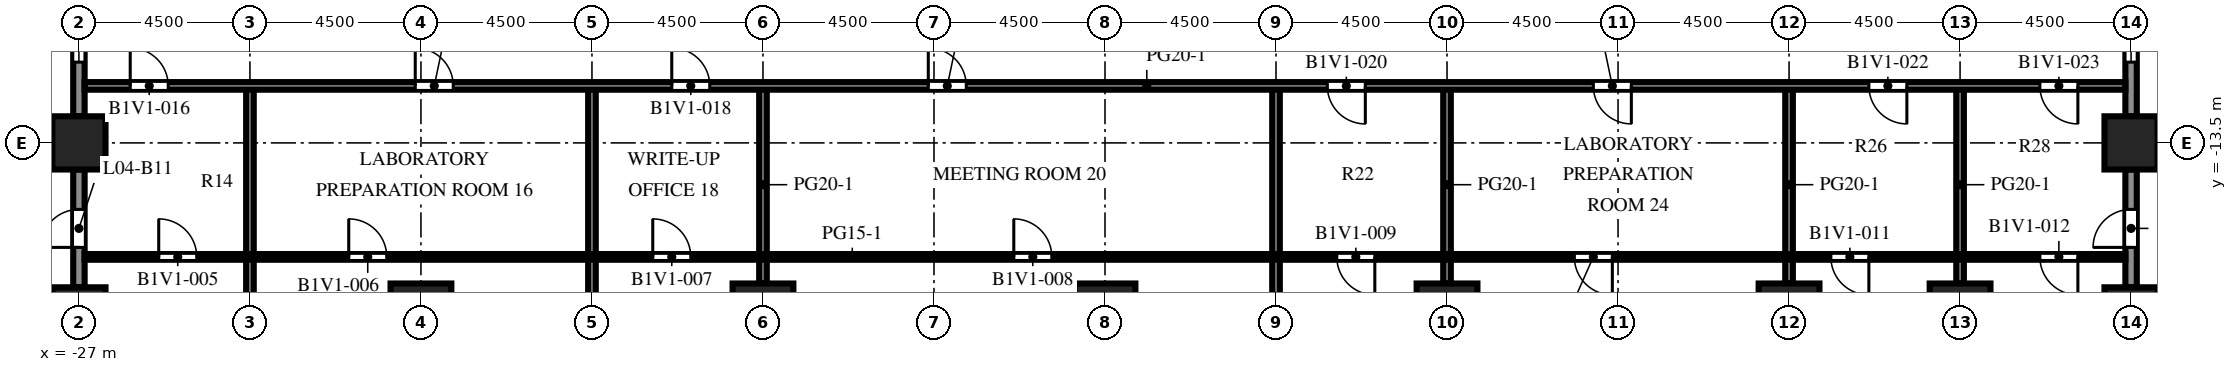
"""IFC4 building model, lengths in metres.
Left out: names, types, materials, properties, quantities, classifications, styles, units other than length and angle.
Written with IfcOpenShell. Run it as: python <this file> out.ifc"""

import sys

from ifc_helpers import new_model, si_unit, direction, frame, frame_2d, origin, origin_2d, place, context, subcontext, project, spatial, rectangle, extrude, element, fill, save


model = new_model("IFC4")
c1 = context("Model", 3, precision=1e-05, world=origin(), true_north=direction((0.0, 1.0)))
c2 = subcontext(c1, "Body", "Model", "MODEL_VIEW")
j1 = project(units=[si_unit("LENGTHUNIT", "METRE"), si_unit("PLANEANGLEUNIT", "RADIAN")], contexts=[c1])
p1 = place(None, origin())
s1 = spatial("IfcSite", under=j1, at=p1, CompositionType="ELEMENT")
p2 = place(p1, origin())
s2 = spatial("IfcBuilding", under=s1, at=p2, CompositionType="ELEMENT")
p3 = place(p2, frame((0.0, 0.0, 19.5)))
s3 = spatial("IfcBuildingStorey", under=s2, at=p3, CompositionType="ELEMENT", Elevation=19.5)
for number, where, z_axis, x_axis in (
    (1, (-27.0, -18.0, 0.0), (0.0, 0.0, 1.0), (1.0, 0.0, 0.0)),
    (2, (-27.0, -13.5, 0.0), (0.0, 0.0, 1.0), (1.0, 0.0, 0.0)),
    (3, (27.0, -18.0, 0.0), (0.0, 0.0, 1.0), (1.0, 0.0, 0.0)),
    (4, (27.0, -13.5, 0.0), (0.0, 0.0, 1.0), (1.0, 0.0, 0.0)),
):
    element("IfcColumn", number, at=place(p3, frame(where, z_axis=z_axis, x_axis=x_axis)), inside=s3, PredefinedType="COLUMN", context=c2, shape_type="SweptSolid", body=[
        extrude(rectangle(XDim=1.4, YDim=1.4, at=origin_2d()), origin(), (0.0, 0.0, 1.0), 4.1),
    ])
for number, where, z_axis, x_axis in (
    (5, (-18.0, -18.0, 0.0), (0.0, 0.0, 1.0), (1.0, 0.0, 0.0)),
    (6, (-9.0, -18.0, 0.0), (0.0, 0.0, 1.0), (1.0, 0.0, 0.0)),
    (7, (0.0, -18.0, 0.0), (0.0, 0.0, 1.0), (1.0, 0.0, 0.0)),
    (8, (9.0, -18.0, 0.0), (0.0, 0.0, 1.0), (1.0, 0.0, 0.0)),
    (9, (18.0, -18.0, 0.0), (0.0, 0.0, 1.0), (1.0, 0.0, 0.0)),
    (10, (22.5, -18.0, 0.0), (0.0, 0.0, 1.0), (1.0, 0.0, 0.0)),
):
    element("IfcColumn", number, at=place(p3, frame(where, z_axis=z_axis, x_axis=x_axis)), inside=s3, PredefinedType="COLUMN", context=c2, shape_type="SweptSolid", body=[
        extrude(rectangle(XDim=1.6, YDim=1.6, at=origin_2d()), origin(), (0.0, 0.0, 1.0), 4.1),
    ])
p4 = place(p3, frame((27.0, -14.2, 0.0), z_axis=(0.0, 0.0, 1.0), x_axis=(0.0, -1.0, 0.0)))
e11 = element("IfcWall", 11, at=p4, inside=s3, PredefinedType="SOLIDWALL", context=c2, shape_type="SweptSolid", body=[
    extrude(rectangle(XDim=3.1, YDim=0.3, at=frame_2d((1.55, 0.0))), origin(), (0.0, 0.0, 1.0), 2.75),
])
p5 = place(p4, frame((1.05, 0.0, 0.0)))
e12 = element("IfcOpeningElement", 12, at=p5, cuts=e11, PredefinedType="OPENING", context=c2, shape_type="SweptSolid", body=[
    extrude(rectangle(XDim=1.0, YDim=2.2, at=frame_2d((0.5, 1.1))), frame((0.0, 0.16, 0.0), z_axis=(0.0, -1.0, 0.0), x_axis=(1.0, 0.0, 0.0)), (0.0, 0.0, 1.0), 0.32),
])
p6 = place(p3, frame((27.0, -9.7, 0.0), z_axis=(0.0, 0.0, 1.0), x_axis=(0.0, -1.0, 0.0)))
e13 = element("IfcWall", 13, at=p6, inside=s3, PredefinedType="SOLIDWALL", context=c2, shape_type="SweptSolid", body=[
    extrude(rectangle(XDim=3.1, YDim=0.3, at=frame_2d((1.55, 0.0))), origin(), (0.0, 0.0, 1.0), 2.75),
])
p7 = place(p6, frame((0.475, 0.0, 0.8)))
e14 = element("IfcOpeningElement", 14, at=p7, cuts=e13, PredefinedType="OPENING", context=c2, shape_type="SweptSolid", body=[
    extrude(rectangle(XDim=1.2, YDim=1.7, at=frame_2d((0.6, 0.85))), frame((0.0, 0.16, 0.0), z_axis=(0.0, -1.0, 0.0), x_axis=(1.0, 0.0, 0.0)), (0.0, 0.0, 1.0), 0.32),
])
p8 = place(p3, frame((-27.0, -12.8, 0.0), z_axis=(0.0, 0.0, 1.0), x_axis=(0.0, 1.0, 0.0)))
e15 = element("IfcWall", 15, at=p8, inside=s3, PredefinedType="SOLIDWALL", context=c2, shape_type="SweptSolid", body=[
    extrude(rectangle(XDim=3.1, YDim=0.3, at=frame_2d((1.55, 0.0))), origin(), (0.0, 0.0, 1.0), 2.75),
])
p9 = place(p8, frame((1.425, 0.0, 0.8)))
e16 = element("IfcOpeningElement", 16, at=p9, cuts=e15, PredefinedType="OPENING", context=c2, shape_type="SweptSolid", body=[
    extrude(rectangle(XDim=1.2, YDim=1.7, at=frame_2d((0.6, 0.85))), frame((0.0, 0.16, 0.0), z_axis=(0.0, -1.0, 0.0), x_axis=(1.0, 0.0, 0.0)), (0.0, 0.0, 1.0), 0.32),
])
p10 = place(p3, frame((-27.0, -17.3, 0.0), z_axis=(0.0, 0.0, 1.0), x_axis=(0.0, 1.0, 0.0)))
e17 = element("IfcWall", 17, at=p10, inside=s3, PredefinedType="SOLIDWALL", context=c2, shape_type="SweptSolid", body=[
    extrude(rectangle(XDim=3.1, YDim=0.3, at=frame_2d((1.55, 0.0))), origin(), (0.0, 0.0, 1.0), 2.75),
])
p11 = place(p10, frame((1.05, 0.0, 0.0)))
e18 = element("IfcOpeningElement", 18, at=p11, cuts=e17, PredefinedType="OPENING", context=c2, shape_type="SweptSolid", body=[
    extrude(rectangle(XDim=1.0, YDim=2.2, at=frame_2d((0.5, 1.1))), frame((0.0, 0.16, 0.0), z_axis=(0.0, -1.0, 0.0), x_axis=(1.0, 0.0, 0.0)), (0.0, 0.0, 1.0), 0.32),
])
for number, where, z_axis, x_axis in (
    (19, (-22.5, -26.3, 0.0), (0.0, 0.0, 1.0), (0.0, 1.0, 0.0)),
    (20, (-13.5, -26.3, 0.0), (0.0, 0.0, 1.0), (0.0, 1.0, 0.0)),
):
    element("IfcWall", number, at=place(p3, frame(where, z_axis=z_axis, x_axis=x_axis)), inside=s3, PredefinedType="PARTITIONING", context=c2, shape_type="SweptSolid", body=[
        extrude(rectangle(XDim=14.3, YDim=0.2, at=frame_2d((7.15, 0.0))), origin(), (0.0, 0.0, 1.0), 3.65),
    ])
p12 = place(p3, frame((-9.0, -17.2, 0.0), z_axis=(0.0, 0.0, 1.0), x_axis=(0.0, 1.0, 0.0)))
e21 = element("IfcWall", 21, at=p12, inside=s3, PredefinedType="PARTITIONING", context=c2, shape_type="SweptSolid", body=[
    extrude(rectangle(XDim=5.2, YDim=0.2, at=frame_2d((2.6, 0.0))), origin(), (0.0, 0.0, 1.0), 3.65),
])
p13 = place(p3, frame((4.5, -26.3, 0.0), z_axis=(0.0, 0.0, 1.0), x_axis=(0.0, 1.0, 0.0)))
e22 = element("IfcWall", 22, at=p13, inside=s3, PredefinedType="PARTITIONING", context=c2, shape_type="SweptSolid", body=[
    extrude(rectangle(XDim=14.3, YDim=0.2, at=frame_2d((7.15, 0.0))), origin(), (0.0, 0.0, 1.0), 3.65),
])
for number, where, z_axis, x_axis in (
    (23, (9.0, -17.2, 0.0), (0.0, 0.0, 1.0), (0.0, 1.0, 0.0)),
    (24, (18.0, -17.2, 0.0), (0.0, 0.0, 1.0), (0.0, 1.0, 0.0)),
    (25, (22.5, -17.2, 0.0), (0.0, 0.0, 1.0), (0.0, 1.0, 0.0)),
):
    element("IfcWall", number, at=place(p3, frame(where, z_axis=z_axis, x_axis=x_axis)), inside=s3, PredefinedType="PARTITIONING", context=c2, shape_type="SweptSolid", body=[
        extrude(rectangle(XDim=5.2, YDim=0.2, at=frame_2d((2.6, 0.0))), origin(), (0.0, 0.0, 1.0), 3.65),
    ])
p14 = place(p3, frame((26.85, -16.5, 0.0), z_axis=(0.0, 0.0, 1.0), x_axis=(-1.0, 0.0, 0.0)))
e26 = element("IfcWall", 26, at=p14, inside=s3, PredefinedType="PARTITIONING", context=c2, shape_type="SweptSolid", body=[
    extrude(rectangle(XDim=53.7, YDim=0.15, at=frame_2d((26.85, 0.0))), origin(), (0.0, 0.0, 1.0), 3.65),
])
p15 = place(p14, frame((50.75, 0.0, 0.0)))
e27 = element("IfcOpeningElement", 27, at=p15, cuts=e26, PredefinedType="OPENING", context=c2, shape_type="SweptSolid", body=[
    extrude(rectangle(XDim=1.0, YDim=2.1, at=frame_2d((0.5, 1.05))), frame((0.0, 0.085, 0.0), z_axis=(0.0, -1.0, 0.0), x_axis=(1.0, 0.0, 0.0)), (0.0, 0.0, 1.0), 0.17),
])
p16 = place(p14, frame((45.75, 0.0, 0.0)))
e28 = element("IfcOpeningElement", 28, at=p16, cuts=e26, PredefinedType="OPENING", context=c2, shape_type="SweptSolid", body=[
    extrude(rectangle(XDim=1.0, YDim=2.1, at=frame_2d((0.5, 1.05))), frame((0.0, 0.085, 0.0), z_axis=(0.0, -1.0, 0.0), x_axis=(1.0, 0.0, 0.0)), (0.0, 0.0, 1.0), 0.17),
])
p17 = place(p14, frame((37.75, 0.0, 0.0)))
e29 = element("IfcOpeningElement", 29, at=p17, cuts=e26, PredefinedType="OPENING", context=c2, shape_type="SweptSolid", body=[
    extrude(rectangle(XDim=1.0, YDim=2.1, at=frame_2d((0.5, 1.05))), frame((0.0, 0.085, 0.0), z_axis=(0.0, -1.0, 0.0), x_axis=(1.0, 0.0, 0.0)), (0.0, 0.0, 1.0), 0.17),
])
p18 = place(p14, frame((28.25, 0.0, 0.0)))
e30 = element("IfcOpeningElement", 30, at=p18, cuts=e26, PredefinedType="OPENING", context=c2, shape_type="SweptSolid", body=[
    extrude(rectangle(XDim=1.0, YDim=2.1, at=frame_2d((0.5, 1.05))), frame((0.0, 0.085, 0.0), z_axis=(0.0, -1.0, 0.0), x_axis=(1.0, 0.0, 0.0)), (0.0, 0.0, 1.0), 0.17),
])
p19 = place(p14, frame((19.75, 0.0, 0.0)))
e31 = element("IfcOpeningElement", 31, at=p19, cuts=e26, PredefinedType="OPENING", context=c2, shape_type="SweptSolid", body=[
    extrude(rectangle(XDim=1.0, YDim=2.1, at=frame_2d((0.5, 1.05))), frame((0.0, 0.085, 0.0), z_axis=(0.0, -1.0, 0.0), x_axis=(1.0, 0.0, 0.0)), (0.0, 0.0, 1.0), 0.17),
])
p20 = place(p14, frame((13.5, 0.0, 0.0)))
e32 = element("IfcOpeningElement", 32, at=p20, cuts=e26, PredefinedType="OPENING", context=c2, shape_type="SweptSolid", body=[
    extrude(rectangle(XDim=1.0, YDim=2.1, at=frame_2d((0.5, 1.05))), frame((0.0, 0.085, 0.0), z_axis=(0.0, -1.0, 0.0), x_axis=(1.0, 0.0, 0.0)), (0.0, 0.0, 1.0), 0.17),
])
p21 = place(p14, frame((6.75, 0.0, 0.0)))
e33 = element("IfcOpeningElement", 33, at=p21, cuts=e26, PredefinedType="OPENING", context=c2, shape_type="SweptSolid", body=[
    extrude(rectangle(XDim=1.0, YDim=2.1, at=frame_2d((0.5, 1.05))), frame((0.0, 0.085, 0.0), z_axis=(0.0, -1.0, 0.0), x_axis=(1.0, 0.0, 0.0)), (0.0, 0.0, 1.0), 0.17),
])
p22 = place(p14, frame((1.25, 0.0, 0.0)))
e34 = element("IfcOpeningElement", 34, at=p22, cuts=e26, PredefinedType="OPENING", context=c2, shape_type="SweptSolid", body=[
    extrude(rectangle(XDim=1.0, YDim=2.1, at=frame_2d((0.5, 1.05))), frame((0.0, 0.085, 0.0), z_axis=(0.0, -1.0, 0.0), x_axis=(1.0, 0.0, 0.0)), (0.0, 0.0, 1.0), 0.17),
])
p23 = place(p3, frame((26.85, -12.0, 0.0), z_axis=(0.0, 0.0, 1.0), x_axis=(-1.0, 0.0, 0.0)))
e35 = element("IfcWall", 35, at=p23, inside=s3, PredefinedType="PARTITIONING", context=c2, shape_type="SweptSolid", body=[
    extrude(rectangle(XDim=53.7, YDim=0.2, at=frame_2d((26.85, 0.0))), origin(), (0.0, 0.0, 1.0), 3.65),
])
p24 = place(p23, frame((51.5, 0.0, 0.0)))
e36 = element("IfcOpeningElement", 36, at=p24, cuts=e35, PredefinedType="OPENING", context=c2, shape_type="SweptSolid", body=[
    extrude(rectangle(XDim=1.0, YDim=2.1, at=frame_2d((0.5, 1.05))), frame((0.0, 0.11, 0.0), z_axis=(0.0, -1.0, 0.0), x_axis=(1.0, 0.0, 0.0)), (0.0, 0.0, 1.0), 0.22),
])
p25 = place(p23, frame((44.0, 0.0, 0.0)))
e37 = element("IfcOpeningElement", 37, at=p25, cuts=e35, PredefinedType="OPENING", context=c2, shape_type="SweptSolid", body=[
    extrude(rectangle(XDim=1.0, YDim=2.1, at=frame_2d((0.5, 1.05))), frame((0.0, 0.11, 0.0), z_axis=(0.0, -1.0, 0.0), x_axis=(1.0, 0.0, 0.0)), (0.0, 0.0, 1.0), 0.22),
])
p26 = place(p23, frame((37.25, 0.0, 0.0)))
e38 = element("IfcOpeningElement", 38, at=p26, cuts=e35, PredefinedType="OPENING", context=c2, shape_type="SweptSolid", body=[
    extrude(rectangle(XDim=1.0, YDim=2.1, at=frame_2d((0.5, 1.05))), frame((0.0, 0.11, 0.0), z_axis=(0.0, -1.0, 0.0), x_axis=(1.0, 0.0, 0.0)), (0.0, 0.0, 1.0), 0.22),
])
p27 = place(p23, frame((30.5, 0.0, 0.0)))
e39 = element("IfcOpeningElement", 39, at=p27, cuts=e35, PredefinedType="OPENING", context=c2, shape_type="SweptSolid", body=[
    extrude(rectangle(XDim=1.0, YDim=2.1, at=frame_2d((0.5, 1.05))), frame((0.0, 0.11, 0.0), z_axis=(0.0, -1.0, 0.0), x_axis=(1.0, 0.0, 0.0)), (0.0, 0.0, 1.0), 0.22),
])
p28 = place(p23, frame((20.0, 0.0, 0.0)))
e40 = element("IfcOpeningElement", 40, at=p28, cuts=e35, PredefinedType="OPENING", context=c2, shape_type="SweptSolid", body=[
    extrude(rectangle(XDim=1.0, YDim=2.1, at=frame_2d((0.5, 1.05))), frame((0.0, 0.11, 0.0), z_axis=(0.0, -1.0, 0.0), x_axis=(1.0, 0.0, 0.0)), (0.0, 0.0, 1.0), 0.22),
])
p29 = place(p23, frame((13.0, 0.0, 0.0)))
e41 = element("IfcOpeningElement", 41, at=p29, cuts=e35, PredefinedType="OPENING", context=c2, shape_type="SweptSolid", body=[
    extrude(rectangle(XDim=1.0, YDim=2.1, at=frame_2d((0.5, 1.05))), frame((0.0, 0.11, 0.0), z_axis=(0.0, -1.0, 0.0), x_axis=(1.0, 0.0, 0.0)), (0.0, 0.0, 1.0), 0.22),
])
p30 = place(p23, frame((5.75, 0.0, 0.0)))
e42 = element("IfcOpeningElement", 42, at=p30, cuts=e35, PredefinedType="OPENING", context=c2, shape_type="SweptSolid", body=[
    extrude(rectangle(XDim=1.0, YDim=2.1, at=frame_2d((0.5, 1.05))), frame((0.0, 0.11, 0.0), z_axis=(0.0, -1.0, 0.0), x_axis=(1.0, 0.0, 0.0)), (0.0, 0.0, 1.0), 0.22),
])
p31 = place(p23, frame((1.25, 0.0, 0.0)))
e43 = element("IfcOpeningElement", 43, at=p31, cuts=e35, PredefinedType="OPENING", context=c2, shape_type="SweptSolid", body=[
    extrude(rectangle(XDim=1.0, YDim=2.1, at=frame_2d((0.5, 1.05))), frame((0.0, 0.11, 0.0), z_axis=(0.0, -1.0, 0.0), x_axis=(1.0, 0.0, 0.0)), (0.0, 0.0, 1.0), 0.22),
])
p32 = place(p5, origin())
e44 = element("IfcDoor", 44, at=p32, inside=s3, OperationType="SINGLE_SWING_RIGHT", PredefinedType="DOOR", context=c2, shape_type="SweptSolid", body=[
    extrude(rectangle(XDim=1.0, YDim=2.2, at=frame_2d((0.5, 1.1))), frame((0.0, 0.025, 0.0), z_axis=(0.0, -1.0, 0.0), x_axis=(1.0, 0.0, 0.0)), (0.0, 0.0, 1.0), 0.05),
])
fill(e12, e44)
p33 = place(p7, origin())
e45 = element("IfcWindow", 45, at=p33, inside=s3, PartitioningType="SINGLE_PANEL", PredefinedType="WINDOW", context=c2, shape_type="SweptSolid", body=[
    extrude(rectangle(XDim=1.2, YDim=1.7, at=frame_2d((0.6, 0.85))), frame((0.0, 0.03, 0.0), z_axis=(0.0, -1.0, 0.0), x_axis=(1.0, 0.0, 0.0)), (0.0, 0.0, 1.0), 0.06),
])
fill(e14, e45)
p34 = place(p9, origin())
e46 = element("IfcWindow", 46, at=p34, inside=s3, PartitioningType="SINGLE_PANEL", PredefinedType="WINDOW", context=c2, shape_type="SweptSolid", body=[
    extrude(rectangle(XDim=1.2, YDim=1.7, at=frame_2d((0.6, 0.85))), frame((0.0, 0.03, 0.0), z_axis=(0.0, -1.0, 0.0), x_axis=(1.0, 0.0, 0.0)), (0.0, 0.0, 1.0), 0.06),
])
fill(e16, e46)
p35 = place(p11, origin())
e47 = element("IfcDoor", 47, at=p35, inside=s3, OperationType="SINGLE_SWING_LEFT", PredefinedType="DOOR", context=c2, shape_type="SweptSolid", body=[
    extrude(rectangle(XDim=1.0, YDim=2.2, at=frame_2d((0.5, 1.1))), frame((0.0, 0.025, 0.0), z_axis=(0.0, -1.0, 0.0), x_axis=(1.0, 0.0, 0.0)), (0.0, 0.0, 1.0), 0.05),
])
fill(e18, e47)
p36 = place(p15, origin())
e48 = element("IfcDoor", 48, at=p36, inside=s3, OperationType="SINGLE_SWING_RIGHT", PredefinedType="DOOR", context=c2, shape_type="SweptSolid", body=[
    extrude(rectangle(XDim=1.0, YDim=2.1, at=frame_2d((0.5, 1.05))), frame((0.0, 0.025, 0.0), z_axis=(0.0, -1.0, 0.0), x_axis=(1.0, 0.0, 0.0)), (0.0, 0.0, 1.0), 0.05),
])
fill(e27, e48)
p37 = place(p16, origin())
e49 = element("IfcDoor", 49, at=p37, inside=s3, OperationType="SINGLE_SWING_RIGHT", PredefinedType="DOOR", context=c2, shape_type="SweptSolid", body=[
    extrude(rectangle(XDim=1.0, YDim=2.1, at=frame_2d((0.5, 1.05))), frame((0.0, 0.025, 0.0), z_axis=(0.0, -1.0, 0.0), x_axis=(1.0, 0.0, 0.0)), (0.0, 0.0, 1.0), 0.05),
])
fill(e28, e49)
p38 = place(p17, origin())
e50 = element("IfcDoor", 50, at=p38, inside=s3, OperationType="SINGLE_SWING_RIGHT", PredefinedType="DOOR", context=c2, shape_type="SweptSolid", body=[
    extrude(rectangle(XDim=1.0, YDim=2.1, at=frame_2d((0.5, 1.05))), frame((0.0, 0.025, 0.0), z_axis=(0.0, -1.0, 0.0), x_axis=(1.0, 0.0, 0.0)), (0.0, 0.0, 1.0), 0.05),
])
fill(e29, e50)
p39 = place(p18, origin())
e51 = element("IfcDoor", 51, at=p39, inside=s3, OperationType="SINGLE_SWING_RIGHT", PredefinedType="DOOR", context=c2, shape_type="SweptSolid", body=[
    extrude(rectangle(XDim=1.0, YDim=2.1, at=frame_2d((0.5, 1.05))), frame((0.0, 0.025, 0.0), z_axis=(0.0, -1.0, 0.0), x_axis=(1.0, 0.0, 0.0)), (0.0, 0.0, 1.0), 0.05),
])
fill(e30, e51)
p40 = place(p19, origin())
e52 = element("IfcDoor", 52, at=p40, inside=s3, OperationType="SINGLE_SWING_LEFT", PredefinedType="DOOR", context=c2, shape_type="SweptSolid", body=[
    extrude(rectangle(XDim=1.0, YDim=2.1, at=frame_2d((0.5, 1.05))), frame((0.0, 0.025, 0.0), z_axis=(0.0, -1.0, 0.0), x_axis=(1.0, 0.0, 0.0)), (0.0, 0.0, 1.0), 0.05),
])
fill(e31, e52)
p41 = place(p20, origin())
e53 = element("IfcDoor", 53, at=p41, inside=s3, OperationType="SINGLE_SWING_LEFT", PredefinedType="DOOR", context=c2, shape_type="SweptSolid", body=[
    extrude(rectangle(XDim=1.0, YDim=2.1, at=frame_2d((0.5, 1.05))), frame((0.0, 0.025, 0.0), z_axis=(0.0, -1.0, 0.0), x_axis=(1.0, 0.0, 0.0)), (0.0, 0.0, 1.0), 0.05),
])
fill(e32, e53)
p42 = place(p21, origin())
e54 = element("IfcDoor", 54, at=p42, inside=s3, OperationType="SINGLE_SWING_LEFT", PredefinedType="DOOR", context=c2, shape_type="SweptSolid", body=[
    extrude(rectangle(XDim=1.0, YDim=2.1, at=frame_2d((0.5, 1.05))), frame((0.0, 0.025, 0.0), z_axis=(0.0, -1.0, 0.0), x_axis=(1.0, 0.0, 0.0)), (0.0, 0.0, 1.0), 0.05),
])
fill(e33, e54)
p43 = place(p22, origin())
e55 = element("IfcDoor", 55, at=p43, inside=s3, OperationType="SINGLE_SWING_LEFT", PredefinedType="DOOR", context=c2, shape_type="SweptSolid", body=[
    extrude(rectangle(XDim=1.0, YDim=2.1, at=frame_2d((0.5, 1.05))), frame((0.0, 0.025, 0.0), z_axis=(0.0, -1.0, 0.0), x_axis=(1.0, 0.0, 0.0)), (0.0, 0.0, 1.0), 0.05),
])
fill(e34, e55)
p44 = place(p24, origin())
e56 = element("IfcDoor", 56, at=p44, inside=s3, OperationType="SINGLE_SWING_RIGHT", PredefinedType="DOOR", context=c2, shape_type="SweptSolid", body=[
    extrude(rectangle(XDim=1.0, YDim=2.1, at=frame_2d((0.5, 1.05))), frame((0.0, 0.025, 0.0), z_axis=(0.0, -1.0, 0.0), x_axis=(1.0, 0.0, 0.0)), (0.0, 0.0, 1.0), 0.05),
])
fill(e36, e56)
p45 = place(p25, origin())
e57 = element("IfcDoor", 57, at=p45, inside=s3, OperationType="SINGLE_SWING_RIGHT", PredefinedType="DOOR", context=c2, shape_type="SweptSolid", body=[
    extrude(rectangle(XDim=1.0, YDim=2.1, at=frame_2d((0.5, 1.05))), frame((0.0, 0.025, 0.0), z_axis=(0.0, -1.0, 0.0), x_axis=(1.0, 0.0, 0.0)), (0.0, 0.0, 1.0), 0.05),
])
fill(e37, e57)
p46 = place(p26, origin())
e58 = element("IfcDoor", 58, at=p46, inside=s3, OperationType="SINGLE_SWING_RIGHT", PredefinedType="DOOR", context=c2, shape_type="SweptSolid", body=[
    extrude(rectangle(XDim=1.0, YDim=2.1, at=frame_2d((0.5, 1.05))), frame((0.0, 0.025, 0.0), z_axis=(0.0, -1.0, 0.0), x_axis=(1.0, 0.0, 0.0)), (0.0, 0.0, 1.0), 0.05),
])
fill(e38, e58)
p47 = place(p27, origin())
e59 = element("IfcDoor", 59, at=p47, inside=s3, OperationType="SINGLE_SWING_RIGHT", PredefinedType="DOOR", context=c2, shape_type="SweptSolid", body=[
    extrude(rectangle(XDim=1.0, YDim=2.1, at=frame_2d((0.5, 1.05))), frame((0.0, 0.025, 0.0), z_axis=(0.0, -1.0, 0.0), x_axis=(1.0, 0.0, 0.0)), (0.0, 0.0, 1.0), 0.05),
])
fill(e39, e59)
p48 = place(p28, origin())
e60 = element("IfcDoor", 60, at=p48, inside=s3, OperationType="SINGLE_SWING_LEFT", PredefinedType="DOOR", context=c2, shape_type="SweptSolid", body=[
    extrude(rectangle(XDim=1.0, YDim=2.1, at=frame_2d((0.5, 1.05))), frame((0.0, 0.025, 0.0), z_axis=(0.0, -1.0, 0.0), x_axis=(1.0, 0.0, 0.0)), (0.0, 0.0, 1.0), 0.05),
])
fill(e40, e60)
p49 = place(p29, origin())
e61 = element("IfcDoor", 61, at=p49, inside=s3, OperationType="SINGLE_SWING_LEFT", PredefinedType="DOOR", context=c2, shape_type="SweptSolid", body=[
    extrude(rectangle(XDim=1.0, YDim=2.1, at=frame_2d((0.5, 1.05))), frame((0.0, 0.025, 0.0), z_axis=(0.0, -1.0, 0.0), x_axis=(1.0, 0.0, 0.0)), (0.0, 0.0, 1.0), 0.05),
])
fill(e41, e61)
p50 = place(p30, origin())
e62 = element("IfcDoor", 62, at=p50, inside=s3, OperationType="SINGLE_SWING_LEFT", PredefinedType="DOOR", context=c2, shape_type="SweptSolid", body=[
    extrude(rectangle(XDim=1.0, YDim=2.1, at=frame_2d((0.5, 1.05))), frame((0.0, 0.025, 0.0), z_axis=(0.0, -1.0, 0.0), x_axis=(1.0, 0.0, 0.0)), (0.0, 0.0, 1.0), 0.05),
])
fill(e42, e62)
p51 = place(p31, origin())
e63 = element("IfcDoor", 63, at=p51, inside=s3, OperationType="SINGLE_SWING_LEFT", PredefinedType="DOOR", context=c2, shape_type="SweptSolid", body=[
    extrude(rectangle(XDim=1.0, YDim=2.1, at=frame_2d((0.5, 1.05))), frame((0.0, 0.025, 0.0), z_axis=(0.0, -1.0, 0.0), x_axis=(1.0, 0.0, 0.0)), (0.0, 0.0, 1.0), 0.05),
])
fill(e43, e63)
save(model, sys.argv[1])
